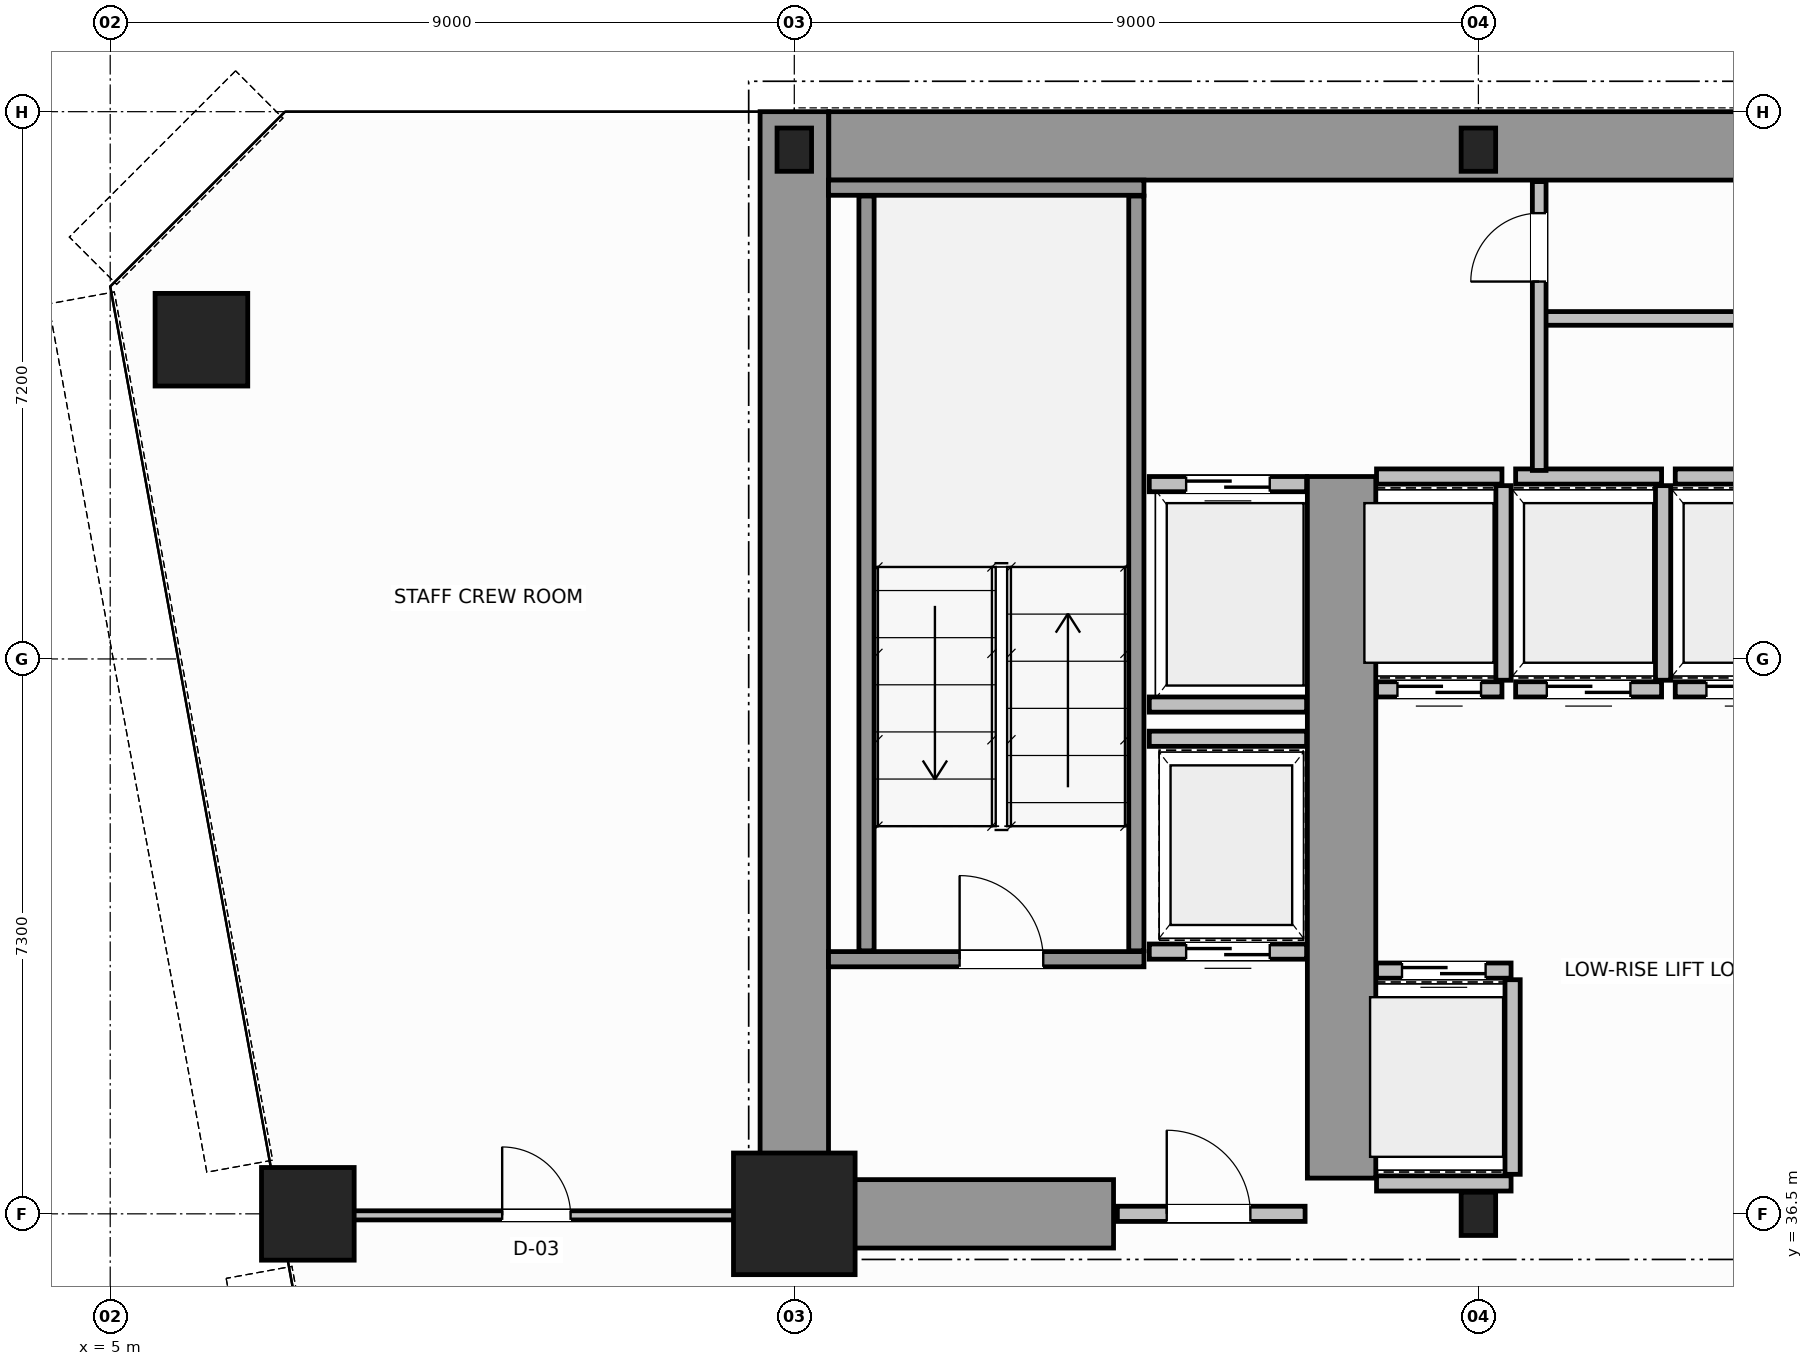
"""IFC4 building model, lengths in metres.
Left out: names, types, materials, properties, quantities, classifications, styles, units other than length and angle.
Written with IfcOpenShell. Run it as: python <this file> out.ifc"""

import sys

from ifc_helpers import new_model, si_unit, direction, frame, frame_2d, origin, origin_2d, place, context, subcontext, project, spatial, rectangle, hollow_circle, i_section, extrude, source, transform, mapped, element, fill, save


model = new_model("IFC4")
c1 = context("Model", 3, precision=1e-05, world=origin(), true_north=direction((0.0, 1.0)))
c2 = subcontext(c1, "Body", "Model", "MODEL_VIEW")
j1 = project(units=[si_unit("LENGTHUNIT", "METRE"), si_unit("PLANEANGLEUNIT", "RADIAN")], contexts=[c1])
p1 = place(None, origin())
s1 = spatial("IfcSite", under=j1, at=p1, CompositionType="ELEMENT")
p2 = place(p1, origin())
s2 = spatial("IfcBuilding", under=s1, at=p2, CompositionType="ELEMENT")
p3 = place(p2, frame((0.0, 0.0, 60.6)))
s3 = spatial("IfcBuildingStorey", under=s2, at=p3, CompositionType="ELEMENT", Elevation=60.6)
m1 = source(origin(), c2, "Body", "SweptSolid", [
    extrude(rectangle(XDim=1.6, YDim=1.6, at=origin_2d()), origin(), (0.0, 0.0, 1.0), 3.8),
])
p4 = place(p3, frame((14.0, 36.5, 0.0), z_axis=(0.0, 0.0, 1.0), x_axis=(1.0, 0.0, 0.0)))
e1 = element("IfcColumn", 1, at=p4, inside=s3, PredefinedType="COLUMN", context=c2, shape_type="MappedRepresentation", body=[
    mapped(m1, transform((0.0, 0.0, 0.0), scale=1.0)),
])
m2 = source(origin(), c2, "Body", "SweptSolid", [
    extrude(i_section(OverallWidth=0.454, OverallDepth=0.569, WebThickness=0.078, FlangeThickness=0.08, FilletRadius=0.015, at=origin_2d()), origin(), (0.0, 0.0, 1.0), 3.8),
])
for number, where, z_axis, x_axis in (
    (2, (23.0, 36.5, 0.0), (0.0, 0.0, 1.0), (1.0, 0.0, 0.0)),
    (3, (14.0, 50.5, 0.0), (0.0, 0.0, 1.0), (1.0, 0.0, 0.0)),
    (4, (23.0, 50.5, 0.0), (0.0, 0.0, 1.0), (1.0, 0.0, 0.0)),
):
    element("IfcColumn", number, at=place(p3, frame(where, z_axis=z_axis, x_axis=x_axis)), inside=s3, PredefinedType="COLUMN", context=c2, shape_type="MappedRepresentation", body=[
        mapped(m2, transform((0.0, 0.0, 0.0), scale=1.0)),
    ])
m3 = source(origin(), c2, "Body", "SweptSolid", [
    extrude(hollow_circle(Radius=0.61, WallThickness=0.05, at=origin_2d()), origin(), (0.0, 0.0, 1.0), 3.8),
])
for number, where, z_axis, x_axis in (
    (5, (6.2, 48.0, 0.0), (0.0, 0.0, 1.0), (1.0, 0.0, 0.0)),
    (6, (7.6, 36.5, 0.0), (0.0, 0.0, 1.0), (1.0, 0.0, 0.0)),
):
    element("IfcColumn", number, at=place(p3, frame(where, z_axis=z_axis, x_axis=x_axis)), inside=s3, PredefinedType="COLUMN", context=c2, shape_type="MappedRepresentation", body=[
        mapped(m3, transform((0.0, 0.0, 0.0), scale=1.0)),
    ])
p5 = place(p3, frame((14.454, 50.55, 0.0), z_axis=(0.0, 0.0, 1.0), x_axis=(1.0, 0.0, 0.0)))
e7 = element("IfcWall", 7, at=p5, inside=s3, PredefinedType="SHEAR", context=c2, shape_type="SweptSolid", body=[
    extrude(rectangle(XDim=19.544, YDim=0.9, at=frame_2d((9.772, 0.0))), origin(), (0.0, 0.0, 1.0), 3.8),
])
p6 = place(p3, frame((14.0, 36.5, 0.0), z_axis=(0.0, 0.0, 1.0), x_axis=(0.0, 1.0, 0.0)))
e8 = element("IfcWall", 8, at=p6, inside=s3, PredefinedType="SHEAR", context=c2, shape_type="SweptSolid", body=[
    extrude(rectangle(XDim=14.5, YDim=0.9, at=frame_2d((7.25, 0.0))), origin(), (0.0, 0.0, 1.0), 3.8),
])
p7 = place(p3, frame((14.47, 36.5, 0.0), z_axis=(0.0, 0.0, 1.0), x_axis=(1.0, 0.0, 0.0)))
e9 = element("IfcWall", 9, at=p7, inside=s3, PredefinedType="SHEAR", context=c2, shape_type="SweptSolid", body=[
    extrude(rectangle(XDim=3.73, YDim=0.9, at=frame_2d((1.865, 0.0))), origin(), (0.0, 0.0, 1.0), 2.38),
])
p8 = place(p3, frame((21.2, 36.97, 0.0), z_axis=(0.0, 0.0, 1.0), x_axis=(0.0, 1.0, 0.0)))
e10 = element("IfcWall", 10, at=p8, inside=s3, PredefinedType="SHEAR", context=c2, shape_type="SweptSolid", body=[
    extrude(rectangle(XDim=9.23, YDim=0.9, at=frame_2d((4.615, 0.0))), origin(), (0.0, 0.0, 1.0), 3.8),
])
p9 = place(p3, frame((14.45, 39.85, 0.0), z_axis=(0.0, 0.0, 1.0), x_axis=(1.0, 0.0, 0.0)))
e11 = element("IfcWall", 11, at=p9, inside=s3, PredefinedType="SOLIDWALL", context=c2, shape_type="SweptSolid", body=[
    extrude(rectangle(XDim=4.15, YDim=0.2, at=frame_2d((2.075, 0.0))), origin(), (0.0, 0.0, 1.0), 3.8),
])
p10 = place(p9, frame((1.725, 0.0, 0.0)))
e12 = element("IfcOpeningElement", 12, at=p10, cuts=e11, PredefinedType="OPENING", context=c2, shape_type="SweptSolid", body=[
    extrude(rectangle(XDim=1.1, YDim=2.15, at=frame_2d((0.55, 1.075))), frame((0.0, 0.11, 0.0), z_axis=(0.0, -1.0, 0.0), x_axis=(1.0, 0.0, 0.0)), (0.0, 0.0, 1.0), 0.22),
])
p11 = place(p3, frame((14.45, 50.0, 0.0), z_axis=(0.0, 0.0, 1.0), x_axis=(1.0, 0.0, 0.0)))
e13 = element("IfcWall", 13, at=p11, inside=s3, PredefinedType="SOLIDWALL", context=c2, shape_type="SweptSolid", body=[
    extrude(rectangle(XDim=4.15, YDim=0.2, at=frame_2d((2.075, 0.0))), origin(), (0.0, 0.0, 1.0), 3.8),
])
for number, where, z_axis, x_axis in (
    (14, (14.95, 39.96, 0.0), (0.0, 0.0, 1.0), (0.0, 1.0, 0.0)),
    (15, (18.5, 39.96, 0.0), (0.0, 0.0, 1.0), (0.0, 1.0, 0.0)),
):
    element("IfcWall", number, at=place(p3, frame(where, z_axis=z_axis, x_axis=x_axis)), inside=s3, PredefinedType="SOLIDWALL", context=c2, shape_type="SweptSolid", body=[
        extrude(rectangle(XDim=9.93, YDim=0.2, at=frame_2d((4.965, 0.0))), origin(), (0.0, 0.0, 1.0), 3.8),
    ])
p12 = place(p3, frame((18.25, 36.5, 0.0), z_axis=(0.0, 0.0, 1.0), x_axis=(1.0, 0.0, 0.0)))
e16 = element("IfcWall", 16, at=p12, inside=s3, PredefinedType="SOLIDWALL", context=c2, shape_type="SweptSolid", body=[
    extrude(rectangle(XDim=2.47, YDim=0.2, at=frame_2d((1.235, 0.0))), origin(), (0.0, 0.0, 1.0), 2.37),
])
p13 = place(p12, frame((0.65, 0.0, 0.0)))
e17 = element("IfcOpeningElement", 17, at=p13, cuts=e16, PredefinedType="OPENING", context=c2, shape_type="SweptSolid", body=[
    extrude(rectangle(XDim=1.1, YDim=2.15, at=frame_2d((0.55, 1.075))), frame((0.0, 0.11, 0.0), z_axis=(0.0, -1.0, 0.0), x_axis=(1.0, 0.0, 0.0)), (0.0, 0.0, 1.0), 0.22),
])
p14 = place(p3, frame((21.66, 39.7, 0.0), z_axis=(0.0, 0.0, 1.0), x_axis=(1.0, 0.0, 0.0)))
e18 = element("IfcWall", 18, at=p14, inside=s3, PredefinedType="SOLIDWALL", context=c2, shape_type="SweptSolid", body=[
    extrude(rectangle(XDim=1.77, YDim=0.2, at=frame_2d((0.885, 0.0))), origin(), (0.0, 0.0, 1.0), 3.58),
])
p15 = place(p14, frame((0.335, 0.0, 0.0)))
e19 = element("IfcOpeningElement", 19, at=p15, cuts=e18, PredefinedType="OPENING", context=c2, shape_type="SweptSolid", body=[
    extrude(rectangle(XDim=1.1, YDim=2.15, at=frame_2d((0.55, 1.075))), frame((0.0, 0.11, 0.0), z_axis=(0.0, -1.0, 0.0), x_axis=(1.0, 0.0, 0.0)), (0.0, 0.0, 1.0), 0.22),
])
p16 = place(p3, frame((21.66, 36.9, 0.0), z_axis=(0.0, 0.0, 1.0), x_axis=(1.0, 0.0, 0.0)))
e20 = element("IfcWall", 20, at=p16, inside=s3, PredefinedType="SOLIDWALL", context=c2, shape_type="SweptSolid", body=[
    extrude(rectangle(XDim=1.77, YDim=0.2, at=frame_2d((0.885, 0.0))), origin(), (0.0, 0.0, 1.0), 2.37),
])
p17 = place(p3, frame((23.45, 37.02, 0.0), z_axis=(0.0, 0.0, 1.0), x_axis=(0.0, 1.0, 0.0)))
e21 = element("IfcWall", 21, at=p17, inside=s3, PredefinedType="SOLIDWALL", context=c2, shape_type="SweptSolid", body=[
    extrude(rectangle(XDim=2.56, YDim=0.2, at=frame_2d((1.28, 0.0))), origin(), (0.0, 0.0, 1.0), 3.58),
])
p18 = place(p3, frame((21.66, 43.4, 0.0), z_axis=(0.0, 0.0, 1.0), x_axis=(1.0, 0.0, 0.0)))
e22 = element("IfcWall", 22, at=p18, inside=s3, PredefinedType="SOLIDWALL", context=c2, shape_type="SweptSolid", body=[
    extrude(rectangle(XDim=1.65, YDim=0.2, at=frame_2d((0.825, 0.0))), origin(), (0.0, 0.0, 1.0), 3.58),
])
p19 = place(p18, frame((0.275, 0.0, 0.0)))
e23 = element("IfcOpeningElement", 23, at=p19, cuts=e22, PredefinedType="OPENING", context=c2, shape_type="SweptSolid", body=[
    extrude(rectangle(XDim=1.1, YDim=2.15, at=frame_2d((0.55, 1.075))), frame((0.0, 0.11, 0.0), z_axis=(0.0, -1.0, 0.0), x_axis=(1.0, 0.0, 0.0)), (0.0, 0.0, 1.0), 0.22),
])
p20 = place(p3, frame((21.66, 46.2, 0.0), z_axis=(0.0, 0.0, 1.0), x_axis=(1.0, 0.0, 0.0)))
e24 = element("IfcWall", 24, at=p20, inside=s3, PredefinedType="SOLIDWALL", context=c2, shape_type="SweptSolid", body=[
    extrude(rectangle(XDim=1.65, YDim=0.2, at=frame_2d((0.825, 0.0))), origin(), (0.0, 0.0, 1.0), 3.58),
])
p21 = place(p3, frame((23.33, 43.52, 0.0), z_axis=(0.0, 0.0, 1.0), x_axis=(0.0, 1.0, 0.0)))
e25 = element("IfcWall", 25, at=p21, inside=s3, PredefinedType="SOLIDWALL", context=c2, shape_type="SweptSolid", body=[
    extrude(rectangle(XDim=2.56, YDim=0.2, at=frame_2d((1.28, 0.0))), origin(), (0.0, 0.0, 1.0), 3.58),
])
p22 = place(p3, frame((23.49, 43.4, 0.0), z_axis=(0.0, 0.0, 1.0), x_axis=(1.0, 0.0, 0.0)))
e26 = element("IfcWall", 26, at=p22, inside=s3, PredefinedType="SOLIDWALL", context=c2, shape_type="SweptSolid", body=[
    extrude(rectangle(XDim=1.92, YDim=0.2, at=frame_2d((0.96, 0.0))), origin(), (0.0, 0.0, 1.0), 3.58),
])
p23 = place(p22, frame((0.41, 0.0, 0.0)))
e27 = element("IfcOpeningElement", 27, at=p23, cuts=e26, PredefinedType="OPENING", context=c2, shape_type="SweptSolid", body=[
    extrude(rectangle(XDim=1.1, YDim=2.15, at=frame_2d((0.55, 1.075))), frame((0.0, 0.11, 0.0), z_axis=(0.0, -1.0, 0.0), x_axis=(1.0, 0.0, 0.0)), (0.0, 0.0, 1.0), 0.22),
])
p24 = place(p3, frame((23.49, 46.2, 0.0), z_axis=(0.0, 0.0, 1.0), x_axis=(1.0, 0.0, 0.0)))
e28 = element("IfcWall", 28, at=p24, inside=s3, PredefinedType="SOLIDWALL", context=c2, shape_type="SweptSolid", body=[
    extrude(rectangle(XDim=1.92, YDim=0.2, at=frame_2d((0.96, 0.0))), origin(), (0.0, 0.0, 1.0), 3.58),
])
p25 = place(p3, frame((25.43, 43.52, 0.0), z_axis=(0.0, 0.0, 1.0), x_axis=(0.0, 1.0, 0.0)))
e29 = element("IfcWall", 29, at=p25, inside=s3, PredefinedType="SOLIDWALL", context=c2, shape_type="SweptSolid", body=[
    extrude(rectangle(XDim=2.56, YDim=0.2, at=frame_2d((1.28, 0.0))), origin(), (0.0, 0.0, 1.0), 3.58),
])
p26 = place(p3, frame((25.59, 43.4, 0.0), z_axis=(0.0, 0.0, 1.0), x_axis=(1.0, 0.0, 0.0)))
e30 = element("IfcWall", 30, at=p26, inside=s3, PredefinedType="SOLIDWALL", context=c2, shape_type="SweptSolid", body=[
    extrude(rectangle(XDim=1.92, YDim=0.2, at=frame_2d((0.96, 0.0))), origin(), (0.0, 0.0, 1.0), 3.58),
])
p27 = place(p26, frame((0.41, 0.0, 0.0)))
e31 = element("IfcOpeningElement", 31, at=p27, cuts=e30, PredefinedType="OPENING", context=c2, shape_type="SweptSolid", body=[
    extrude(rectangle(XDim=1.1, YDim=2.15, at=frame_2d((0.55, 1.075))), frame((0.0, 0.11, 0.0), z_axis=(0.0, -1.0, 0.0), x_axis=(1.0, 0.0, 0.0)), (0.0, 0.0, 1.0), 0.22),
])
p28 = place(p3, frame((25.59, 46.2, 0.0), z_axis=(0.0, 0.0, 1.0), x_axis=(1.0, 0.0, 0.0)))
e32 = element("IfcWall", 32, at=p28, inside=s3, PredefinedType="SOLIDWALL", context=c2, shape_type="SweptSolid", body=[
    extrude(rectangle(XDim=1.92, YDim=0.2, at=frame_2d((0.96, 0.0))), origin(), (0.0, 0.0, 1.0), 3.58),
])
p29 = place(p3, frame((18.67, 46.1, 0.0), z_axis=(0.0, 0.0, 1.0), x_axis=(1.0, 0.0, 0.0)))
e33 = element("IfcWall", 33, at=p29, inside=s3, PredefinedType="SOLIDWALL", context=c2, shape_type="SweptSolid", body=[
    extrude(rectangle(XDim=2.07, YDim=0.2, at=frame_2d((1.035, 0.0))), origin(), (0.0, 0.0, 1.0), 3.58),
])
p30 = place(p29, frame((0.485, 0.0, 0.0)))
e34 = element("IfcOpeningElement", 34, at=p30, cuts=e33, PredefinedType="OPENING", context=c2, shape_type="SweptSolid", body=[
    extrude(rectangle(XDim=1.1, YDim=2.15, at=frame_2d((0.55, 1.075))), frame((0.0, 0.11, 0.0), z_axis=(0.0, -1.0, 0.0), x_axis=(1.0, 0.0, 0.0)), (0.0, 0.0, 1.0), 0.22),
])
p31 = place(p3, frame((18.67, 43.2, 0.0), z_axis=(0.0, 0.0, 1.0), x_axis=(1.0, 0.0, 0.0)))
e35 = element("IfcWall", 35, at=p31, inside=s3, PredefinedType="SOLIDWALL", context=c2, shape_type="SweptSolid", body=[
    extrude(rectangle(XDim=2.07, YDim=0.2, at=frame_2d((1.035, 0.0))), origin(), (0.0, 0.0, 1.0), 3.58),
])
p32 = place(p3, frame((18.67, 39.95, 0.0), z_axis=(0.0, 0.0, 1.0), x_axis=(1.0, 0.0, 0.0)))
e36 = element("IfcWall", 36, at=p32, inside=s3, PredefinedType="SOLIDWALL", context=c2, shape_type="SweptSolid", body=[
    extrude(rectangle(XDim=2.07, YDim=0.2, at=frame_2d((1.035, 0.0))), origin(), (0.0, 0.0, 1.0), 3.58),
])
p33 = place(p32, frame((0.485, 0.0, 0.0)))
e37 = element("IfcOpeningElement", 37, at=p33, cuts=e36, PredefinedType="OPENING", context=c2, shape_type="SweptSolid", body=[
    extrude(rectangle(XDim=1.1, YDim=2.15, at=frame_2d((0.55, 1.075))), frame((0.0, 0.11, 0.0), z_axis=(0.0, -1.0, 0.0), x_axis=(1.0, 0.0, 0.0)), (0.0, 0.0, 1.0), 0.22),
])
p34 = place(p3, frame((18.67, 42.75, 0.0), z_axis=(0.0, 0.0, 1.0), x_axis=(1.0, 0.0, 0.0)))
e38 = element("IfcWall", 38, at=p34, inside=s3, PredefinedType="SOLIDWALL", context=c2, shape_type="SweptSolid", body=[
    extrude(rectangle(XDim=2.07, YDim=0.2, at=frame_2d((1.035, 0.0))), origin(), (0.0, 0.0, 1.0), 3.58),
])
p35 = place(p3, frame((23.85, 48.28, 0.0), z_axis=(0.0, 0.0, 1.0), x_axis=(1.0, 0.0, 0.0)))
e39 = element("IfcWall", 39, at=p35, inside=s3, PredefinedType="PLUMBINGWALL", context=c2, shape_type="SweptSolid", body=[
    extrude(rectangle(XDim=15.03, YDim=0.18, at=frame_2d((7.515, 0.0))), origin(), (0.0, 0.0, 1.0), 3.58),
])
p36 = place(p35, frame((2.9, 0.0, 0.0)))
e40 = element("IfcOpeningElement", 40, at=p36, cuts=e39, PredefinedType="OPENING", context=c2, shape_type="SweptSolid", body=[
    extrude(rectangle(XDim=0.9, YDim=2.15, at=frame_2d((0.45, 1.075))), frame((0.0, 0.1, 0.0), z_axis=(0.0, -1.0, 0.0), x_axis=(1.0, 0.0, 0.0)), (0.0, 0.0, 1.0), 0.2),
])
p37 = place(p35, frame((10.4, 0.0, 0.0)))
e41 = element("IfcOpeningElement", 41, at=p37, cuts=e39, PredefinedType="OPENING", context=c2, shape_type="SweptSolid", body=[
    extrude(rectangle(XDim=0.9, YDim=2.15, at=frame_2d((0.45, 1.075))), frame((0.0, 0.1, 0.0), z_axis=(0.0, -1.0, 0.0), x_axis=(1.0, 0.0, 0.0)), (0.0, 0.0, 1.0), 0.2),
])
p38 = place(p3, frame((23.8, 46.28, 0.0), z_axis=(0.0, 0.0, 1.0), x_axis=(0.0, 1.0, 0.0)))
e42 = element("IfcWall", 42, at=p38, inside=s3, PredefinedType="PLUMBINGWALL", context=c2, shape_type="SweptSolid", body=[
    extrude(rectangle(XDim=3.8, YDim=0.18, at=frame_2d((1.9, 0.0))), origin(), (0.0, 0.0, 1.0), 3.58),
])
p39 = place(p38, frame((2.485, 0.0, 0.0)))
e43 = element("IfcOpeningElement", 43, at=p39, cuts=e42, PredefinedType="OPENING", context=c2, shape_type="SweptSolid", body=[
    extrude(rectangle(XDim=0.9, YDim=2.15, at=frame_2d((0.45, 1.075))), frame((0.0, 0.1, 0.0), z_axis=(0.0, -1.0, 0.0), x_axis=(1.0, 0.0, 0.0)), (0.0, 0.0, 1.0), 0.2),
])
p40 = place(p3, frame((7.274, 36.48, 0.0), z_axis=(0.0, 0.0, 1.0), x_axis=(1.0, 0.0, 0.0)))
e44 = element("IfcWall", 44, at=p40, inside=s3, PredefinedType="PARTITIONING", context=c2, shape_type="SweptSolid", body=[
    extrude(rectangle(XDim=6.666, YDim=0.12, at=frame_2d((3.333, 0.0))), origin(), (0.0, 0.0, 1.0), 2.77),
])
p41 = place(p40, frame((2.883, 0.0, 0.0)))
e45 = element("IfcOpeningElement", 45, at=p41, cuts=e44, PredefinedType="OPENING", context=c2, shape_type="SweptSolid", body=[
    extrude(rectangle(XDim=0.9, YDim=2.15, at=frame_2d((0.45, 1.075))), frame((0.0, 0.07, 0.0), z_axis=(0.0, -1.0, 0.0), x_axis=(1.0, 0.0, 0.0)), (0.0, 0.0, 1.0), 0.14),
])
m4 = source(origin(), c2, "Body", "SweptSolid", [
    extrude(rectangle(XDim=1.1, YDim=2.15, at=frame_2d((0.55, 1.075))), frame((0.0, 0.025, 0.0), z_axis=(0.0, -1.0, 0.0), x_axis=(1.0, 0.0, 0.0)), (0.0, 0.0, 1.0), 0.05),
])
p42 = place(p10, origin())
e46 = element("IfcDoor", 46, at=p42, inside=s3, OperationType="SINGLE_SWING_LEFT", PredefinedType="DOOR", context=c2, shape_type="MappedRepresentation", body=[
    mapped(m4, transform((0.0, 0.0, 0.0), scale=1.0)),
])
fill(e12, e46)
p43 = place(p13, origin())
e47 = element("IfcDoor", 47, at=p43, inside=s3, OperationType="SINGLE_SWING_RIGHT", PredefinedType="DOOR", context=c2, shape_type="MappedRepresentation", body=[
    mapped(m4, transform((0.0, 0.0, 0.0), scale=1.0)),
])
fill(e17, e47)
p44 = place(p15, origin())
e48 = element("IfcDoor", 48, at=p44, inside=s3, OperationType="DOUBLE_DOOR_SLIDING", PredefinedType="DOOR", context=c2, shape_type="MappedRepresentation", body=[
    mapped(m4, transform((0.0, 0.0, 0.0), scale=1.0)),
])
fill(e19, e48)
p45 = place(p19, origin())
e49 = element("IfcDoor", 49, at=p45, inside=s3, OperationType="DOUBLE_DOOR_SLIDING", PredefinedType="DOOR", context=c2, shape_type="MappedRepresentation", body=[
    mapped(m4, transform((0.0, 0.0, 0.0), scale=1.0)),
])
fill(e23, e49)
p46 = place(p23, origin())
e50 = element("IfcDoor", 50, at=p46, inside=s3, OperationType="DOUBLE_DOOR_SLIDING", PredefinedType="DOOR", context=c2, shape_type="MappedRepresentation", body=[
    mapped(m4, transform((0.0, 0.0, 0.0), scale=1.0)),
])
fill(e27, e50)
p47 = place(p27, origin())
e51 = element("IfcDoor", 51, at=p47, inside=s3, OperationType="DOUBLE_DOOR_SLIDING", PredefinedType="DOOR", context=c2, shape_type="MappedRepresentation", body=[
    mapped(m4, transform((0.0, 0.0, 0.0), scale=1.0)),
])
fill(e31, e51)
p48 = place(p30, origin())
e52 = element("IfcDoor", 52, at=p48, inside=s3, OperationType="DOUBLE_DOOR_SLIDING", PredefinedType="DOOR", context=c2, shape_type="MappedRepresentation", body=[
    mapped(m4, transform((0.0, 0.0, 0.0), scale=1.0)),
])
fill(e34, e52)
p49 = place(p33, origin())
e53 = element("IfcDoor", 53, at=p49, inside=s3, OperationType="DOUBLE_DOOR_SLIDING", PredefinedType="DOOR", context=c2, shape_type="MappedRepresentation", body=[
    mapped(m4, transform((0.0, 0.0, 0.0), scale=1.0)),
])
fill(e37, e53)
m5 = source(origin(), c2, "Body", "SweptSolid", [
    extrude(rectangle(XDim=0.9, YDim=2.15, at=frame_2d((0.45, 1.075))), frame((0.0, 0.025, 0.0), z_axis=(0.0, -1.0, 0.0), x_axis=(1.0, 0.0, 0.0)), (0.0, 0.0, 1.0), 0.05),
])
p50 = place(p39, origin())
e54 = element("IfcDoor", 54, at=p50, inside=s3, OperationType="SINGLE_SWING_LEFT", PredefinedType="DOOR", context=c2, shape_type="MappedRepresentation", body=[
    mapped(m5, transform((0.0, 0.0, 0.0), scale=1.0)),
])
fill(e43, e54)
p51 = place(p41, origin())
e55 = element("IfcDoor", 55, at=p51, inside=s3, OperationType="SINGLE_SWING_LEFT", PredefinedType="DOOR", context=c2, shape_type="MappedRepresentation", body=[
    mapped(m5, transform((0.0, 0.0, 0.0), scale=1.0)),
])
fill(e45, e55)
save(model, sys.argv[1])
